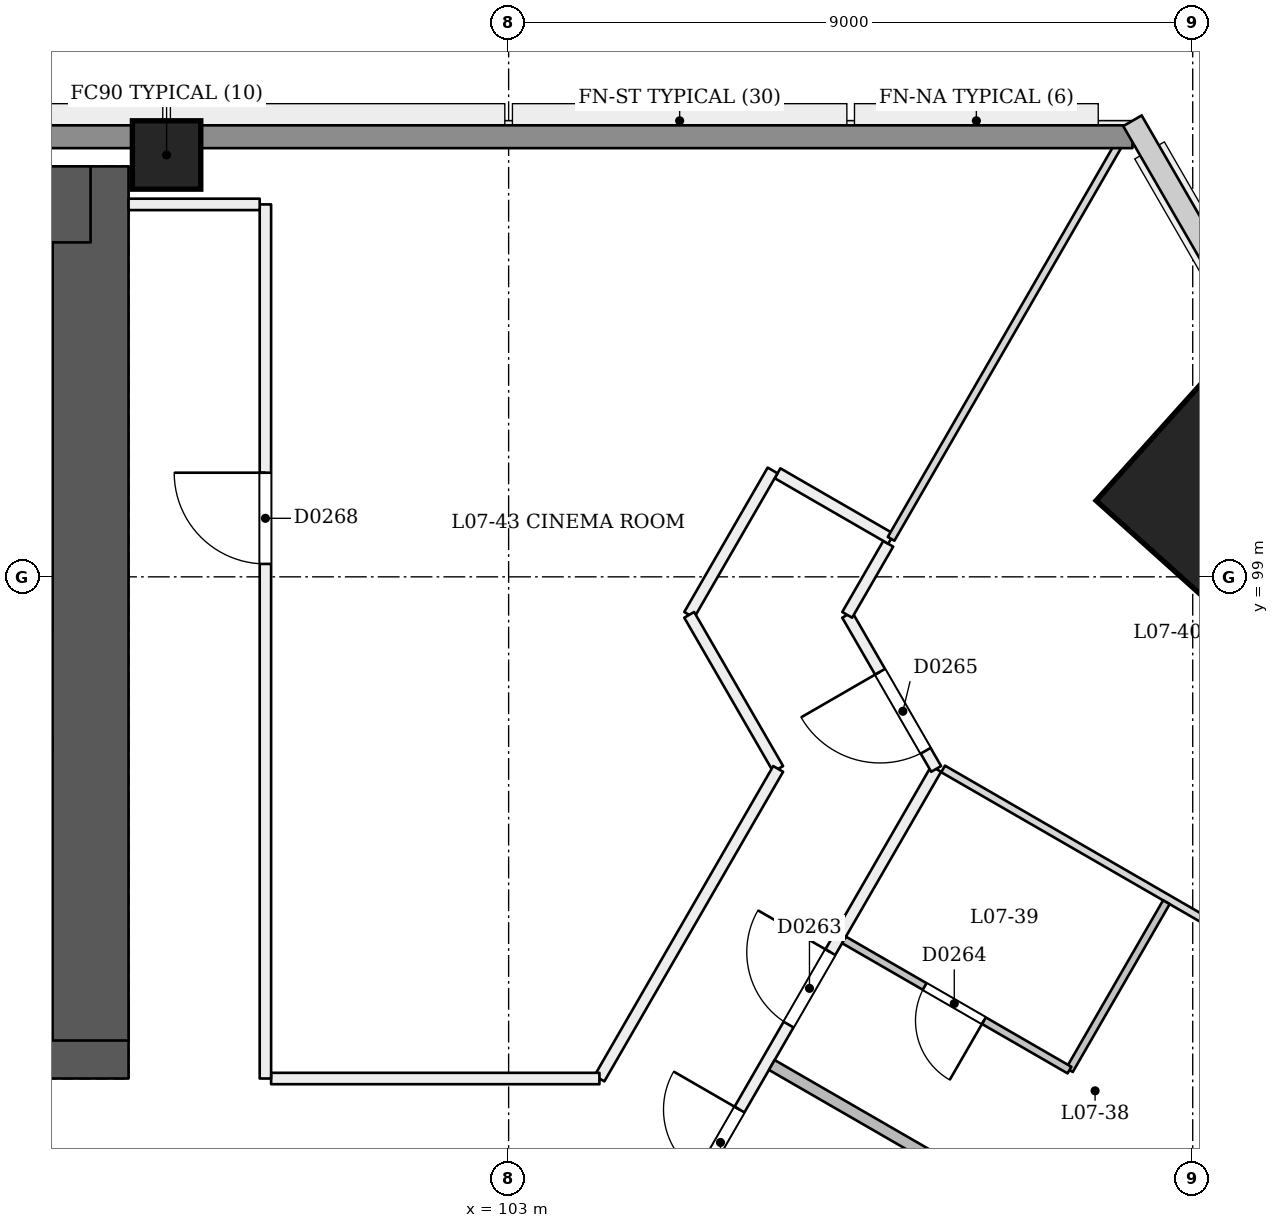
"""IFC4 building model, lengths in metres.
Left out: names, types, materials, properties, quantities, classifications, styles, units other than length and angle.
Written with IfcOpenShell. Run it as: python <this file> out.ifc"""

import sys

from ifc_helpers import new_model, si_unit, direction, frame, frame_2d, origin, origin_2d, place, context, subcontext, project, spatial, rectangle, extrude, element, fill, save


model = new_model("IFC4")
c1 = context("Model", 3, precision=1e-05, world=origin(), true_north=direction((0.0, 1.0)))
c2 = subcontext(c1, "Body", "Model", "MODEL_VIEW")
j1 = project(units=[si_unit("LENGTHUNIT", "METRE"), si_unit("PLANEANGLEUNIT", "RADIAN")], contexts=[c1])
p1 = place(None, origin())
s1 = spatial("IfcSite", under=j1, at=p1, CompositionType="ELEMENT")
p2 = place(p1, origin())
s2 = spatial("IfcBuilding", under=s1, at=p2, CompositionType="ELEMENT")
p3 = place(p2, frame((0.0, 0.0, 34.2)))
s3 = spatial("IfcBuildingStorey", under=s2, at=p3, CompositionType="ELEMENT", Elevation=34.2)
p4 = place(p3, frame((72.5, 92.9, 0.0), z_axis=(0.0, 0.0, 1.0), x_axis=(1.0, 0.0, 0.0)))
e1 = element("IfcWall", 1, at=p4, inside=s3, PredefinedType="SHEAR", context=c2, shape_type="SweptSolid", body=[
    extrude(rectangle(XDim=25.5, YDim=1.0, at=frame_2d((12.75, 0.0))), origin(), (0.0, 0.0, 1.0), 3.6),
])
p5 = place(p4, frame((1.3, 0.0, 0.0)))
e2 = element("IfcOpeningElement", 2, at=p5, cuts=e1, PredefinedType="OPENING", context=c2, shape_type="SweptSolid", body=[
    extrude(rectangle(XDim=1.2, YDim=2.1, at=frame_2d((0.6, 1.05))), frame((0.0, 0.51, 0.0), z_axis=(0.0, -1.0, 0.0), x_axis=(1.0, 0.0, 0.0)), (0.0, 0.0, 1.0), 1.021),
])
p6 = place(p4, frame((3.5, 0.0, 0.0)))
e3 = element("IfcOpeningElement", 3, at=p6, cuts=e1, PredefinedType="OPENING", context=c2, shape_type="SweptSolid", body=[
    extrude(rectangle(XDim=1.2, YDim=2.1, at=frame_2d((0.6, 1.05))), frame((0.0, 0.51, 0.0), z_axis=(0.0, -1.0, 0.0), x_axis=(1.0, 0.0, 0.0)), (0.0, 0.0, 1.0), 1.021),
])
p7 = place(p4, frame((13.5, 0.0, 0.0)))
e4 = element("IfcOpeningElement", 4, at=p7, cuts=e1, PredefinedType="OPENING", context=c2, shape_type="SweptSolid", body=[
    extrude(rectangle(XDim=1.2, YDim=2.1, at=frame_2d((0.6, 1.05))), frame((0.0, 0.51, 0.0), z_axis=(0.0, -1.0, 0.0), x_axis=(1.0, 0.0, 0.0)), (0.0, 0.0, 1.0), 1.021),
])
p8 = place(p4, frame((15.812, 0.0, 0.0)))
e5 = element("IfcOpeningElement", 5, at=p8, cuts=e1, PredefinedType="OPENING", context=c2, shape_type="SweptSolid", body=[
    extrude(rectangle(XDim=1.0, YDim=2.1, at=frame_2d((0.5, 1.05))), frame((0.0, 0.51, 0.0), z_axis=(0.0, -1.0, 0.0), x_axis=(1.0, 0.0, 0.0)), (0.0, 0.0, 1.0), 1.021),
])
p9 = place(p4, frame((19.25, 0.0, 0.0)))
e6 = element("IfcOpeningElement", 6, at=p9, cuts=e1, PredefinedType="OPENING", context=c2, shape_type="SweptSolid", body=[
    extrude(rectangle(XDim=1.0, YDim=2.1, at=frame_2d((0.5, 1.05))), frame((0.0, 0.51, 0.0), z_axis=(0.0, -1.0, 0.0), x_axis=(1.0, 0.0, 0.0)), (0.0, 0.0, 1.0), 1.021),
])
p10 = place(p4, frame((22.788, 0.0, 0.0)))
e7 = element("IfcOpeningElement", 7, at=p10, cuts=e1, PredefinedType="OPENING", context=c2, shape_type="SweptSolid", body=[
    extrude(rectangle(XDim=1.0, YDim=2.1, at=frame_2d((0.5, 1.05))), frame((0.0, 0.51, 0.0), z_axis=(0.0, -1.0, 0.0), x_axis=(1.0, 0.0, 0.0)), (0.0, 0.0, 1.0), 1.021),
])
p11 = place(p3, frame((97.5, 92.9, 0.0), z_axis=(0.0, 0.0, 1.0), x_axis=(0.0, 1.0, 0.0)))
e8 = element("IfcWall", 8, at=p11, inside=s3, PredefinedType="SHEAR", context=c2, shape_type="SweptSolid", body=[
    extrude(rectangle(XDim=11.5, YDim=1.0, at=frame_2d((5.75, 0.0))), origin(), (0.0, 0.0, 1.0), 3.6),
])
p12 = place(p3, frame((97.5, 103.9, 0.0), z_axis=(0.0, 0.0, 1.0), x_axis=(-1.0, 0.0, 0.0)))
e9 = element("IfcWall", 9, at=p12, inside=s3, PredefinedType="SHEAR", context=c2, shape_type="SweptSolid", body=[
    extrude(rectangle(XDim=25.5, YDim=1.0, at=frame_2d((12.75, 0.0))), origin(), (0.0, 0.0, 1.0), 3.6),
])
p13 = place(p3, frame((112.543, 100.086, 0.0), z_axis=(-0.028401796786, 0.009286506348, 0.999553449666), x_axis=(0.498881273913, -0.866385327315, 0.02222474187)))
e10 = element("IfcColumn", 10, at=p13, inside=s3, PredefinedType="COLUMN", context=c2, shape_type="SweptSolid", body=[
    extrude(rectangle(XDim=2.52, YDim=2.52, at=origin_2d()), origin(), (0.0, 0.0, 1.0), 3.602),
])
p14 = place(p3, frame((98.5, 104.55, 0.0), z_axis=(0.0, 0.0, 1.0), x_axis=(1.0, 0.0, 0.0)))
e11 = element("IfcColumn", 11, at=p14, inside=s3, PredefinedType="COLUMN", context=c2, shape_type="SweptSolid", body=[
    extrude(rectangle(XDim=0.9, YDim=0.9, at=origin_2d()), origin(), (0.0, 0.0, 1.0), 3.6),
])
p15 = place(p3, frame((86.17, 57.581, 0.0), z_axis=(0.0, 0.0, 1.0), x_axis=(0.499999785607, 0.866025527565, 0.0)))
e12 = element("IfcWall", 12, at=p15, inside=s3, PredefinedType="PARTITIONING", context=c2, shape_type="SweptSolid", body=[
    extrude(rectangle(XDim=44.909, YDim=0.15, at=frame_2d((22.454, 0.0))), origin(), (0.0, 0.0, 1.0), 2.7),
])
p16 = place(p15, frame((0.675, 0.0, 0.0)))
e13 = element("IfcOpeningElement", 13, at=p16, cuts=e12, PredefinedType="OPENING", context=c2, shape_type="SweptSolid", body=[
    extrude(rectangle(XDim=1.0, YDim=2.1, at=frame_2d((0.5, 1.05))), frame((0.0, 0.085, 0.0), z_axis=(0.0, -1.0, 0.0), x_axis=(1.0, 0.0, 0.0)), (0.0, 0.0, 1.0), 0.171),
])
p17 = place(p15, frame((5.175, 0.0, 0.0)))
e14 = element("IfcOpeningElement", 14, at=p17, cuts=e12, PredefinedType="OPENING", context=c2, shape_type="SweptSolid", body=[
    extrude(rectangle(XDim=1.0, YDim=2.1, at=frame_2d((0.5, 1.05))), frame((0.0, 0.085, 0.0), z_axis=(0.0, -1.0, 0.0), x_axis=(1.0, 0.0, 0.0)), (0.0, 0.0, 1.0), 0.171),
])
p18 = place(p15, frame((11.734, 0.0, 0.0)))
e15 = element("IfcOpeningElement", 15, at=p18, cuts=e12, PredefinedType="OPENING", context=c2, shape_type="SweptSolid", body=[
    extrude(rectangle(XDim=1.0, YDim=2.1, at=frame_2d((0.5, 1.05))), frame((0.0, 0.085, 0.0), z_axis=(0.0, -1.0, 0.0), x_axis=(1.0, 0.0, 0.0)), (0.0, 0.0, 1.0), 0.171),
])
p19 = place(p15, frame((14.175, 0.0, 0.0)))
e16 = element("IfcOpeningElement", 16, at=p19, cuts=e12, PredefinedType="OPENING", context=c2, shape_type="SweptSolid", body=[
    extrude(rectangle(XDim=1.0, YDim=2.1, at=frame_2d((0.5, 1.05))), frame((0.0, 0.085, 0.0), z_axis=(0.0, -1.0, 0.0), x_axis=(1.0, 0.0, 0.0)), (0.0, 0.0, 1.0), 0.171),
])
p20 = place(p15, frame((19.704, 0.0, 0.0)))
e17 = element("IfcOpeningElement", 17, at=p20, cuts=e12, PredefinedType="OPENING", context=c2, shape_type="SweptSolid", body=[
    extrude(rectangle(XDim=1.0, YDim=2.1, at=frame_2d((0.5, 1.05))), frame((0.0, 0.085, 0.0), z_axis=(0.0, -1.0, 0.0), x_axis=(1.0, 0.0, 0.0)), (0.0, 0.0, 1.0), 0.171),
])
p21 = place(p15, frame((23.175, 0.0, 0.0)))
e18 = element("IfcOpeningElement", 18, at=p21, cuts=e12, PredefinedType="OPENING", context=c2, shape_type="SweptSolid", body=[
    extrude(rectangle(XDim=1.0, YDim=2.1, at=frame_2d((0.5, 1.05))), frame((0.0, 0.085, 0.0), z_axis=(0.0, -1.0, 0.0), x_axis=(1.0, 0.0, 0.0)), (0.0, 0.0, 1.0), 0.171),
])
p22 = place(p15, frame((29.85, 0.0, 0.0)))
e19 = element("IfcOpeningElement", 19, at=p22, cuts=e12, PredefinedType="OPENING", context=c2, shape_type="SweptSolid", body=[
    extrude(rectangle(XDim=1.0, YDim=2.1, at=frame_2d((0.5, 1.05))), frame((0.0, 0.085, 0.0), z_axis=(0.0, -1.0, 0.0), x_axis=(1.0, 0.0, 0.0)), (0.0, 0.0, 1.0), 0.171),
])
p23 = place(p15, frame((32.059, 0.0, 0.0)))
e20 = element("IfcOpeningElement", 20, at=p23, cuts=e12, PredefinedType="OPENING", context=c2, shape_type="SweptSolid", body=[
    extrude(rectangle(XDim=1.0, YDim=2.1, at=frame_2d((0.5, 1.05))), frame((0.0, 0.085, 0.0), z_axis=(0.0, -1.0, 0.0), x_axis=(1.0, 0.0, 0.0)), (0.0, 0.0, 1.0), 0.171),
])
p24 = place(p15, frame((38.734, 0.0, 0.0)))
e21 = element("IfcOpeningElement", 21, at=p24, cuts=e12, PredefinedType="OPENING", context=c2, shape_type="SweptSolid", body=[
    extrude(rectangle(XDim=1.0, YDim=2.1, at=frame_2d((0.5, 1.05))), frame((0.0, 0.085, 0.0), z_axis=(0.0, -1.0, 0.0), x_axis=(1.0, 0.0, 0.0)), (0.0, 0.0, 1.0), 0.171),
])
p25 = place(p15, frame((41.025, 0.0, 0.0)))
e22 = element("IfcOpeningElement", 22, at=p25, cuts=e12, PredefinedType="OPENING", context=c2, shape_type="SweptSolid", body=[
    extrude(rectangle(XDim=1.1, YDim=2.1, at=frame_2d((0.55, 1.05))), frame((0.0, 0.085, 0.0), z_axis=(0.0, -1.0, 0.0), x_axis=(1.0, 0.0, 0.0)), (0.0, 0.0, 1.0), 0.171),
])
p26 = place(p3, frame((108.625, 96.473, 0.0), z_axis=(0.0, 0.0, 1.0), x_axis=(-0.499987330634, 0.866032718323, 0.0)))
e23 = element("IfcWall", 23, at=p26, inside=s3, PredefinedType="PARTITIONING", context=c2, shape_type="SweptSolid", body=[
    extrude(rectangle(XDim=2.34, YDim=0.15, at=frame_2d((1.17, 0.0))), origin(), (0.0, 0.0, 1.0), 3.1),
])
p27 = place(p26, frame((0.276, 0.0, 0.0)))
e24 = element("IfcOpeningElement", 24, at=p27, cuts=e23, PredefinedType="OPENING", context=c2, shape_type="SweptSolid", body=[
    extrude(rectangle(XDim=1.2, YDim=2.1, at=frame_2d((0.6, 1.05))), frame((0.0, 0.085, 0.0), z_axis=(0.0, -1.0, 0.0), x_axis=(1.0, 0.0, 0.0)), (0.0, 0.0, 1.0), 0.171),
])
p28 = place(p3, frame((107.454, 98.5, 0.0), z_axis=(0.0, 0.0, 1.0), x_axis=(0.499957341738, 0.866050031143, 0.0)))
e25 = element("IfcWall", 25, at=p28, inside=s3, PredefinedType="PARTITIONING", context=c2, shape_type="SweptSolid", body=[
    extrude(rectangle(XDim=1.08, YDim=0.15, at=frame_2d((0.54, 0.0))), origin(), (0.0, 0.0, 1.0), 3.1),
])
p29 = place(p3, frame((108.032, 99.5, 0.0), z_axis=(0.0, 0.0, 1.0), x_axis=(-0.866013532718, 0.500020560727, 0.0)))
e26 = element("IfcWall", 26, at=p29, inside=s3, PredefinedType="PARTITIONING", context=c2, shape_type="SweptSolid", body=[
    extrude(rectangle(XDim=1.725, YDim=0.15, at=frame_2d((0.863, 0.0))), origin(), (0.0, 0.0, 1.0), 3.1),
])
p30 = place(p3, frame((106.473, 100.4, 0.0), z_axis=(0.0, 0.0, 1.0), x_axis=(-0.500005024956, -0.866022502605, 0.0)))
e27 = element("IfcWall", 27, at=p30, inside=s3, PredefinedType="PARTITIONING", context=c2, shape_type="SweptSolid", body=[
    extrude(rectangle(XDim=2.194, YDim=0.15, at=frame_2d((1.097, 0.0))), origin(), (0.0, 0.0, 1.0), 3.1),
])
p31 = place(p3, frame((105.376, 98.5, 0.0), z_axis=(0.0, 0.0, 1.0), x_axis=(0.500065562951, -0.865987547688, 0.0)))
e28 = element("IfcWall", 28, at=p31, inside=s3, PredefinedType="PARTITIONING", context=c2, shape_type="SweptSolid", body=[
    extrude(rectangle(XDim=2.341, YDim=0.15, at=frame_2d((1.17, 0.0))), origin(), (0.0, 0.0, 1.0), 3.1),
])
p32 = place(p3, frame((106.546, 96.473, 0.0), z_axis=(0.0, 0.0, 1.0), x_axis=(-0.499980071345, -0.866036909293, 0.0)))
e29 = element("IfcWall", 29, at=p32, inside=s3, PredefinedType="PARTITIONING", context=c2, shape_type="SweptSolid", body=[
    extrude(rectangle(XDim=4.703, YDim=0.15, at=frame_2d((2.352, 0.0))), origin(), (0.0, 0.0, 1.0), 3.1),
])
p33 = place(p3, frame((104.195, 92.4, 0.0), z_axis=(0.0, 0.0, 1.0), x_axis=(-1.0, 0.0, 0.0)))
e30 = element("IfcWall", 30, at=p33, inside=s3, PredefinedType="PARTITIONING", context=c2, shape_type="SweptSolid", body=[
    extrude(rectangle(XDim=4.32, YDim=0.15, at=frame_2d((2.16, 0.0))), origin(), (0.0, 0.0, 1.0), 3.1),
])
p34 = place(p3, frame((99.8, 92.4, 0.0), z_axis=(0.0, 0.0, 1.0), x_axis=(0.0, 1.0, 0.0)))
e31 = element("IfcWall", 31, at=p34, inside=s3, PredefinedType="PARTITIONING", context=c2, shape_type="SweptSolid", body=[
    extrude(rectangle(XDim=11.5, YDim=0.15, at=frame_2d((5.75, 0.0))), origin(), (0.0, 0.0, 1.0), 2.6),
])
p35 = place(p34, frame((6.77, 0.0, 0.0)))
e32 = element("IfcOpeningElement", 32, at=p35, cuts=e31, PredefinedType="OPENING", context=c2, shape_type="SweptSolid", body=[
    extrude(rectangle(XDim=1.2, YDim=2.1, at=frame_2d((0.6, 1.05))), frame((0.0, 0.085, 0.0), z_axis=(0.0, -1.0, 0.0), x_axis=(1.0, 0.0, 0.0)), (0.0, 0.0, 1.0), 0.171),
])
p36 = place(p3, frame((99.725, 103.9, 0.0), z_axis=(0.0, 0.0, 1.0), x_axis=(-1.0, 0.0, 0.0)))
e33 = element("IfcWall", 33, at=p36, inside=s3, PredefinedType="PARTITIONING", context=c2, shape_type="SweptSolid", body=[
    extrude(rectangle(XDim=1.725, YDim=0.15, at=frame_2d((0.863, 0.0))), origin(), (0.0, 0.0, 1.0), 2.6),
])
p37 = place(p3, frame((111.958, 89.406, 0.0), z_axis=(0.0, 0.0, 1.0), x_axis=(-0.866025401434, 0.500000004071, 0.0)))
e34 = element("IfcWall", 34, at=p37, inside=s3, PredefinedType="PARTITIONING", context=c2, shape_type="SweptSolid", body=[
    extrude(rectangle(XDim=6.345, YDim=0.15, at=frame_2d((3.173, 0.0))), origin(), (0.0, 0.0, 1.0), 2.6),
])
p38 = place(p3, frame((111.654, 94.719, 0.0), z_axis=(0.0, 0.0, 1.0), x_axis=(-0.500020783669, -0.866013403995, 0.0)))
e35 = element("IfcWall", 35, at=p38, inside=s3, PredefinedType="PARTITIONING", context=c2, shape_type="SweptSolid", body=[
    extrude(rectangle(XDim=2.55, YDim=0.1, at=frame_2d((1.275, 0.0))), origin(), (0.0, 0.0, 1.0), 2.6),
])
p39 = place(p3, frame((110.378, 92.511, 0.0), z_axis=(0.0, 0.0, 1.0), x_axis=(-0.866032454348, 0.499987787867, 0.0)))
e36 = element("IfcWall", 36, at=p39, inside=s3, PredefinedType="PARTITIONING", context=c2, shape_type="SweptSolid", body=[
    extrude(rectangle(XDim=3.425, YDim=0.1, at=frame_2d((1.712, 0.0))), origin(), (0.0, 0.0, 1.0), 3.1),
])
p40 = place(p39, frame((1.3, 0.0, 0.0)))
e37 = element("IfcOpeningElement", 37, at=p40, cuts=e36, PredefinedType="OPENING", context=c2, shape_type="SweptSolid", body=[
    extrude(rectangle(XDim=0.9, YDim=2.1, at=frame_2d((0.45, 1.05))), frame((0.0, 0.061, 0.0), z_axis=(0.0, -1.0, 0.0), x_axis=(1.0, 0.0, 0.0)), (0.0, 0.0, 1.0), 0.121),
])
p41 = place(p3, frame((114.208, 93.302, 0.0), z_axis=(0.0, 0.0, 1.0), x_axis=(-0.866014393704, 0.500019069534, 0.0)))
e38 = element("IfcWall", 38, at=p41, inside=s3, PredefinedType="PARTITIONING", context=c2, shape_type="SweptSolid", body=[
    extrude(rectangle(XDim=6.341, YDim=0.1, at=frame_2d((3.17, 0.0))), origin(), (0.0, 0.0, 1.0), 2.6),
])
p42 = place(p3, frame((111.149, 104.9, 0.0), z_axis=(0.0, 0.0, 1.0), x_axis=(-0.500004896655, -0.866022576681, 0.0)))
e39 = element("IfcWall", 39, at=p42, inside=s3, PredefinedType="PARTITIONING", context=c2, shape_type="SweptSolid", body=[
    extrude(rectangle(XDim=6.235, YDim=0.1, at=frame_2d((3.118, 0.0))), origin(), (0.0, 0.0, 1.0), 2.6),
])
p43 = place(p3, frame((58.793, 104.79, 0.0), z_axis=(0.0, 0.0, 1.0), x_axis=(1.0, 0.0, 0.0)))
e40 = element("IfcWall", 40, at=p43, inside=s3, PredefinedType="SOLIDWALL", context=c2, shape_type="SweptSolid", body=[
    extrude(rectangle(XDim=52.414, YDim=0.3, at=frame_2d((26.207, 0.0))), origin(), (0.0, 0.0, 1.0), 2.6),
])
p44 = place(p24, origin())
e41 = element("IfcDoor", 41, at=p44, inside=s3, OperationType="SINGLE_SWING_RIGHT", PredefinedType="NOTDEFINED", context=c2, shape_type="SweptSolid", body=[
    extrude(rectangle(XDim=1.0, YDim=2.1, at=frame_2d((0.5, 1.05))), frame((0.0, 0.025, 0.0), z_axis=(0.0, -1.0, 0.0), x_axis=(1.0, 0.0, 0.0)), (0.0, 0.0, 1.0), 0.05),
])
fill(e21, e41)
p45 = place(p25, origin())
e42 = element("IfcDoor", 42, at=p45, inside=s3, OperationType="SINGLE_SWING_RIGHT", PredefinedType="NOTDEFINED", context=c2, shape_type="SweptSolid", body=[
    extrude(rectangle(XDim=1.1, YDim=2.1, at=frame_2d((0.55, 1.05))), frame((0.0, 0.025, 0.0), z_axis=(0.0, -1.0, 0.0), x_axis=(1.0, 0.0, 0.0)), (0.0, 0.0, 1.0), 0.05),
])
fill(e22, e42)
p46 = place(p40, origin())
e43 = element("IfcDoor", 43, at=p46, inside=s3, OperationType="SINGLE_SWING_LEFT", PredefinedType="NOTDEFINED", context=c2, shape_type="SweptSolid", body=[
    extrude(rectangle(XDim=0.9, YDim=2.1, at=frame_2d((0.45, 1.05))), frame((0.0, 0.025, 0.0), z_axis=(0.0, -1.0, 0.0), x_axis=(1.0, 0.0, 0.0)), (0.0, 0.0, 1.0), 0.05),
])
fill(e37, e43)
p47 = place(p27, origin())
e44 = element("IfcDoor", 44, at=p47, inside=s3, OperationType="SINGLE_SWING_RIGHT", PredefinedType="NOTDEFINED", context=c2, shape_type="SweptSolid", body=[
    extrude(rectangle(XDim=1.2, YDim=2.1, at=frame_2d((0.6, 1.05))), frame((0.0, 0.025, 0.0), z_axis=(0.0, -1.0, 0.0), x_axis=(1.0, 0.0, 0.0)), (0.0, 0.0, 1.0), 0.05),
])
fill(e24, e44)
p48 = place(p35, origin())
e45 = element("IfcDoor", 45, at=p48, inside=s3, OperationType="SINGLE_SWING_RIGHT", PredefinedType="NOTDEFINED", context=c2, shape_type="SweptSolid", body=[
    extrude(rectangle(XDim=1.2, YDim=2.1, at=frame_2d((0.6, 1.05))), frame((0.0, 0.025, 0.0), z_axis=(0.0, -1.0, 0.0), x_axis=(1.0, 0.0, 0.0)), (0.0, 0.0, 1.0), 0.05),
])
fill(e32, e45)
save(model, sys.argv[1])
